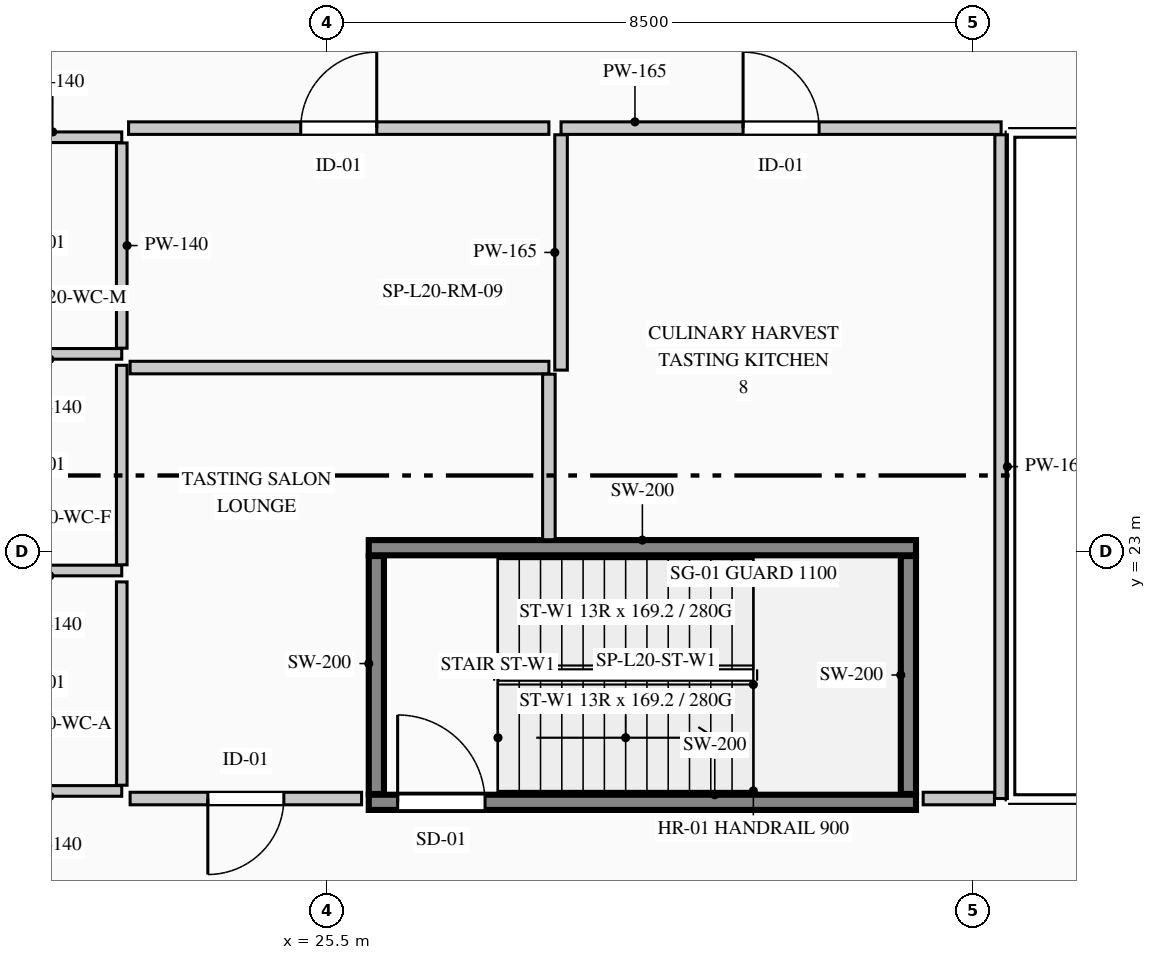
"""IFC4 building model, lengths in metres.
Left out: names, types, materials, properties, quantities, classifications, styles, units other than length and angle.
Written with IfcOpenShell. Run it as: python <this file> out.ifc"""

import sys

from ifc_helpers import new_model, si_unit, direction, frame, frame_2d, origin, place, context, subcontext, project, spatial, rectangle, extrude, element, fill, save


model = new_model("IFC4")
c1 = context("Model", 3, precision=1e-05, world=origin(), true_north=direction((0.0, 1.0)))
c2 = subcontext(c1, "Body", "Model", "MODEL_VIEW")
j1 = project(units=[si_unit("LENGTHUNIT", "METRE"), si_unit("PLANEANGLEUNIT", "RADIAN")], contexts=[c1])
p1 = place(None, origin())
s1 = spatial("IfcSite", under=j1, at=p1, CompositionType="ELEMENT")
p2 = place(p1, origin())
s2 = spatial("IfcBuilding", under=s1, at=p2, CompositionType="ELEMENT")
p3 = place(p2, frame((0.0, 0.0, 88.6)))
s3 = spatial("IfcBuildingStorey", under=s2, at=p3, CompositionType="ELEMENT", Elevation=88.6)
p4 = place(p3, frame((26.05, 19.7, 0.0), z_axis=(0.0, 0.0, 1.0), x_axis=(1.0, 0.0, 0.0)))
e1 = element("IfcWall", 1, at=p4, inside=s3, PredefinedType="SHEAR", context=c2, shape_type="SweptSolid", body=[
    extrude(rectangle(XDim=7.2, YDim=0.2, at=frame_2d((3.6, 0.0))), origin(), (0.0, 0.0, 1.0), 4.4),
])
p5 = place(p4, frame((0.38, 0.0, 0.0)))
e2 = element("IfcOpeningElement", 2, at=p5, cuts=e1, PredefinedType="OPENING", context=c2, shape_type="SweptSolid", body=[
    extrude(rectangle(XDim=1.15, YDim=2.2, at=frame_2d((0.575, 1.1))), frame((0.0, 0.11, 0.0), z_axis=(0.0, -1.0, 0.0), x_axis=(1.0, 0.0, 0.0)), (0.0, 0.0, 1.0), 0.22),
])
p6 = place(p3, frame((26.05, 23.05, 0.0), z_axis=(0.0, 0.0, 1.0), x_axis=(1.0, 0.0, 0.0)))
e3 = element("IfcWall", 3, at=p6, inside=s3, PredefinedType="SHEAR", context=c2, shape_type="SweptSolid", body=[
    extrude(rectangle(XDim=7.2, YDim=0.2, at=frame_2d((3.6, 0.0))), origin(), (0.0, 0.0, 1.0), 4.4),
])
for number, where, z_axis, x_axis in (
    (4, (26.15, 19.81, 0.0), (0.0, 0.0, 1.0), (0.0, 1.0, 0.0)),
    (5, (33.15, 19.81, 0.0), (0.0, 0.0, 1.0), (0.0, 1.0, 0.0)),
):
    element("IfcWall", number, at=place(p3, frame(where, z_axis=z_axis, x_axis=x_axis)), inside=s3, PredefinedType="SHEAR", context=c2, shape_type="SweptSolid", body=[
        extrude(rectangle(XDim=3.13, YDim=0.2, at=frame_2d((1.565, 0.0))), origin(), (0.0, 0.0, 1.0), 4.4),
    ])
p7 = place(p3, frame((22.8, 25.6, 0.0), z_axis=(0.0, 0.0, 1.0), x_axis=(-1.0, 0.0, 0.0)))
e6 = element("IfcWall", 6, at=p7, inside=s3, PredefinedType="PARTITIONING", context=c2, shape_type="SweptSolid", body=[
    extrude(rectangle(XDim=1.89, YDim=0.14, at=frame_2d((0.945, 0.0))), origin(), (0.0, 0.0, 1.0), 4.115),
])
p8 = place(p3, frame((20.985, 28.45, 0.0), z_axis=(0.0, 0.0, 1.0), x_axis=(1.0, 0.0, 0.0)))
e7 = element("IfcWall", 7, at=p8, inside=s3, PredefinedType="PARTITIONING", context=c2, shape_type="SweptSolid", body=[
    extrude(rectangle(XDim=1.815, YDim=0.14, at=frame_2d((0.907, 0.0))), origin(), (0.0, 0.0, 1.0), 4.115),
])
p9 = place(p3, frame((22.8, 28.375, 0.0), z_axis=(0.0, 0.0, 1.0), x_axis=(0.0, -1.0, 0.0)))
e8 = element("IfcWall", 8, at=p9, inside=s3, PredefinedType="PARTITIONING", context=c2, shape_type="SweptSolid", body=[
    extrude(rectangle(XDim=2.7, YDim=0.14, at=frame_2d((1.35, 0.0))), origin(), (0.0, 0.0, 1.0), 3.8),
])
p10 = place(p3, frame((22.8, 22.75, 0.0), z_axis=(0.0, 0.0, 1.0), x_axis=(-1.0, 0.0, 0.0)))
e9 = element("IfcWall", 9, at=p10, inside=s3, PredefinedType="PARTITIONING", context=c2, shape_type="SweptSolid", body=[
    extrude(rectangle(XDim=1.89, YDim=0.14, at=frame_2d((0.945, 0.0))), origin(), (0.0, 0.0, 1.0), 4.115),
])
p11 = place(p3, frame((22.8, 25.45, 0.0), z_axis=(0.0, 0.0, 1.0), x_axis=(0.0, -1.0, 0.0)))
e10 = element("IfcWall", 10, at=p11, inside=s3, PredefinedType="PARTITIONING", context=c2, shape_type="SweptSolid", body=[
    extrude(rectangle(XDim=2.625, YDim=0.14, at=frame_2d((1.312, 0.0))), origin(), (0.0, 0.0, 1.0), 3.8),
])
p12 = place(p3, frame((22.8, 19.85, 0.0), z_axis=(0.0, 0.0, 1.0), x_axis=(-1.0, 0.0, 0.0)))
e11 = element("IfcWall", 11, at=p12, inside=s3, PredefinedType="PARTITIONING", context=c2, shape_type="SweptSolid", body=[
    extrude(rectangle(XDim=1.89, YDim=0.14, at=frame_2d((0.945, 0.0))), origin(), (0.0, 0.0, 1.0), 4.115),
])
p13 = place(p3, frame((22.8, 22.6, 0.0), z_axis=(0.0, 0.0, 1.0), x_axis=(0.0, -1.0, 0.0)))
e12 = element("IfcWall", 12, at=p13, inside=s3, PredefinedType="PARTITIONING", context=c2, shape_type="SweptSolid", body=[
    extrude(rectangle(XDim=2.675, YDim=0.14, at=frame_2d((1.337, 0.0))), origin(), (0.0, 0.0, 1.0), 3.8),
])
p14 = place(p3, frame((25.956, 19.75, 0.0), z_axis=(0.0, 0.0, 1.0), x_axis=(-1.0, 0.0, 0.0)))
e13 = element("IfcWall", 13, at=p14, inside=s3, PredefinedType="PARTITIONING", context=c2, shape_type="SweptSolid", body=[
    extrude(rectangle(XDim=3.046, YDim=0.165, at=frame_2d((1.523, 0.0))), origin(), (0.0, 0.0, 1.0), 4.115),
])
p15 = place(p14, frame((1.023, 0.0, 0.0)))
e14 = element("IfcOpeningElement", 14, at=p15, cuts=e13, PredefinedType="OPENING", context=c2, shape_type="SweptSolid", body=[
    extrude(rectangle(XDim=1.0, YDim=2.15, at=frame_2d((0.5, 1.075))), frame((0.0, 0.093, 0.0), z_axis=(0.0, -1.0, 0.0), x_axis=(1.0, 0.0, 0.0)), (0.0, 0.0, 1.0), 0.185),
])
p16 = place(p3, frame((22.91, 25.42, 0.0), z_axis=(0.0, 0.0, 1.0), x_axis=(1.0, 0.0, 0.0)))
e15 = element("IfcWall", 15, at=p16, inside=s3, PredefinedType="PARTITIONING", context=c2, shape_type="SweptSolid", body=[
    extrude(rectangle(XDim=5.51, YDim=0.165, at=frame_2d((2.755, 0.0))), origin(), (0.0, 0.0, 1.0), 3.8),
])
p17 = place(p3, frame((28.42, 25.333, 0.0), z_axis=(0.0, 0.0, 1.0), x_axis=(0.0, -1.0, 0.0)))
e16 = element("IfcWall", 16, at=p17, inside=s3, PredefinedType="PARTITIONING", context=c2, shape_type="SweptSolid", body=[
    extrude(rectangle(XDim=2.177, YDim=0.165, at=frame_2d((1.089, 0.0))), origin(), (0.0, 0.0, 1.0), 4.115),
])
p18 = place(p3, frame((28.58, 28.57, 0.0), z_axis=(0.0, 0.0, 1.0), x_axis=(1.0, 0.0, 0.0)))
e17 = element("IfcWall", 17, at=p18, inside=s3, PredefinedType="PARTITIONING", context=c2, shape_type="SweptSolid", body=[
    extrude(rectangle(XDim=5.79, YDim=0.165, at=frame_2d((2.895, 0.0))), origin(), (0.0, 0.0, 1.0), 3.8),
])
p19 = place(p18, frame((2.395, 0.0, 0.0)))
e18 = element("IfcOpeningElement", 18, at=p19, cuts=e17, PredefinedType="OPENING", context=c2, shape_type="SweptSolid", body=[
    extrude(rectangle(XDim=1.0, YDim=2.15, at=frame_2d((0.5, 1.075))), frame((0.0, 0.093, 0.0), z_axis=(0.0, -1.0, 0.0), x_axis=(1.0, 0.0, 0.0)), (0.0, 0.0, 1.0), 0.185),
])
p20 = place(p3, frame((34.37, 28.482, 0.0), z_axis=(0.0, 0.0, 1.0), x_axis=(0.0, -1.0, 0.0)))
e19 = element("IfcWall", 19, at=p20, inside=s3, PredefinedType="PARTITIONING", context=c2, shape_type="SweptSolid", body=[
    extrude(rectangle(XDim=8.732, YDim=0.165, at=frame_2d((4.366, 0.0))), origin(), (0.0, 0.0, 1.0), 4.115),
])
p21 = place(p3, frame((34.282, 19.75, 0.0), z_axis=(0.0, 0.0, 1.0), x_axis=(-1.0, 0.0, 0.0)))
e20 = element("IfcWall", 20, at=p21, inside=s3, PredefinedType="PARTITIONING", context=c2, shape_type="SweptSolid", body=[
    extrude(rectangle(XDim=0.938, YDim=0.165, at=frame_2d((0.469, 0.0))), origin(), (0.0, 0.0, 1.0), 4.115),
])
p22 = place(p3, frame((28.58, 25.386, 0.0), z_axis=(0.0, 0.0, 1.0), x_axis=(0.0, 1.0, 0.0)))
e21 = element("IfcWall", 21, at=p22, inside=s3, PredefinedType="PARTITIONING", context=c2, shape_type="SweptSolid", body=[
    extrude(rectangle(XDim=3.096, YDim=0.165, at=frame_2d((1.548, 0.0))), origin(), (0.0, 0.0, 1.0), 4.115),
])
p23 = place(p3, frame((22.89, 28.57, 0.0), z_axis=(0.0, 0.0, 1.0), x_axis=(1.0, 0.0, 0.0)))
e22 = element("IfcWall", 22, at=p23, inside=s3, PredefinedType="PARTITIONING", context=c2, shape_type="SweptSolid", body=[
    extrude(rectangle(XDim=5.53, YDim=0.165, at=frame_2d((2.765, 0.0))), origin(), (0.0, 0.0, 1.0), 3.8),
])
p24 = place(p23, frame((2.265, 0.0, 0.0)))
e23 = element("IfcOpeningElement", 23, at=p24, cuts=e22, PredefinedType="OPENING", context=c2, shape_type="SweptSolid", body=[
    extrude(rectangle(XDim=1.0, YDim=2.15, at=frame_2d((0.5, 1.075))), frame((0.0, 0.093, 0.0), z_axis=(0.0, -1.0, 0.0), x_axis=(1.0, 0.0, 0.0)), (0.0, 0.0, 1.0), 0.185),
])
p25 = place(p5, origin())
e24 = element("IfcDoor", 24, at=p25, inside=s3, OperationType="SINGLE_SWING_LEFT", PredefinedType="DOOR", context=c2, shape_type="SweptSolid", body=[
    extrude(rectangle(XDim=1.15, YDim=2.2, at=frame_2d((0.575, 1.1))), frame((0.0, 0.025, 0.0), z_axis=(0.0, -1.0, 0.0), x_axis=(1.0, 0.0, 0.0)), (0.0, 0.0, 1.0), 0.05),
])
fill(e2, e24)
p26 = place(p15, origin())
e25 = element("IfcDoor", 25, at=p26, inside=s3, OperationType="SINGLE_SWING_RIGHT", PredefinedType="DOOR", context=c2, shape_type="SweptSolid", body=[
    extrude(rectangle(XDim=1.0, YDim=2.15, at=frame_2d((0.5, 1.075))), frame((0.0, 0.025, 0.0), z_axis=(0.0, -1.0, 0.0), x_axis=(1.0, 0.0, 0.0)), (0.0, 0.0, 1.0), 0.05),
])
fill(e14, e25)
p27 = place(p19, origin())
e26 = element("IfcDoor", 26, at=p27, inside=s3, OperationType="SINGLE_SWING_LEFT", PredefinedType="DOOR", context=c2, shape_type="SweptSolid", body=[
    extrude(rectangle(XDim=1.0, YDim=2.15, at=frame_2d((0.5, 1.075))), frame((0.0, 0.025, 0.0), z_axis=(0.0, -1.0, 0.0), x_axis=(1.0, 0.0, 0.0)), (0.0, 0.0, 1.0), 0.05),
])
fill(e18, e26)
p28 = place(p24, origin())
e27 = element("IfcDoor", 27, at=p28, inside=s3, OperationType="SINGLE_SWING_RIGHT", PredefinedType="DOOR", context=c2, shape_type="SweptSolid", body=[
    extrude(rectangle(XDim=1.0, YDim=2.15, at=frame_2d((0.5, 1.075))), frame((0.0, 0.025, 0.0), z_axis=(0.0, -1.0, 0.0), x_axis=(1.0, 0.0, 0.0)), (0.0, 0.0, 1.0), 0.05),
])
fill(e23, e27)
save(model, sys.argv[1])
